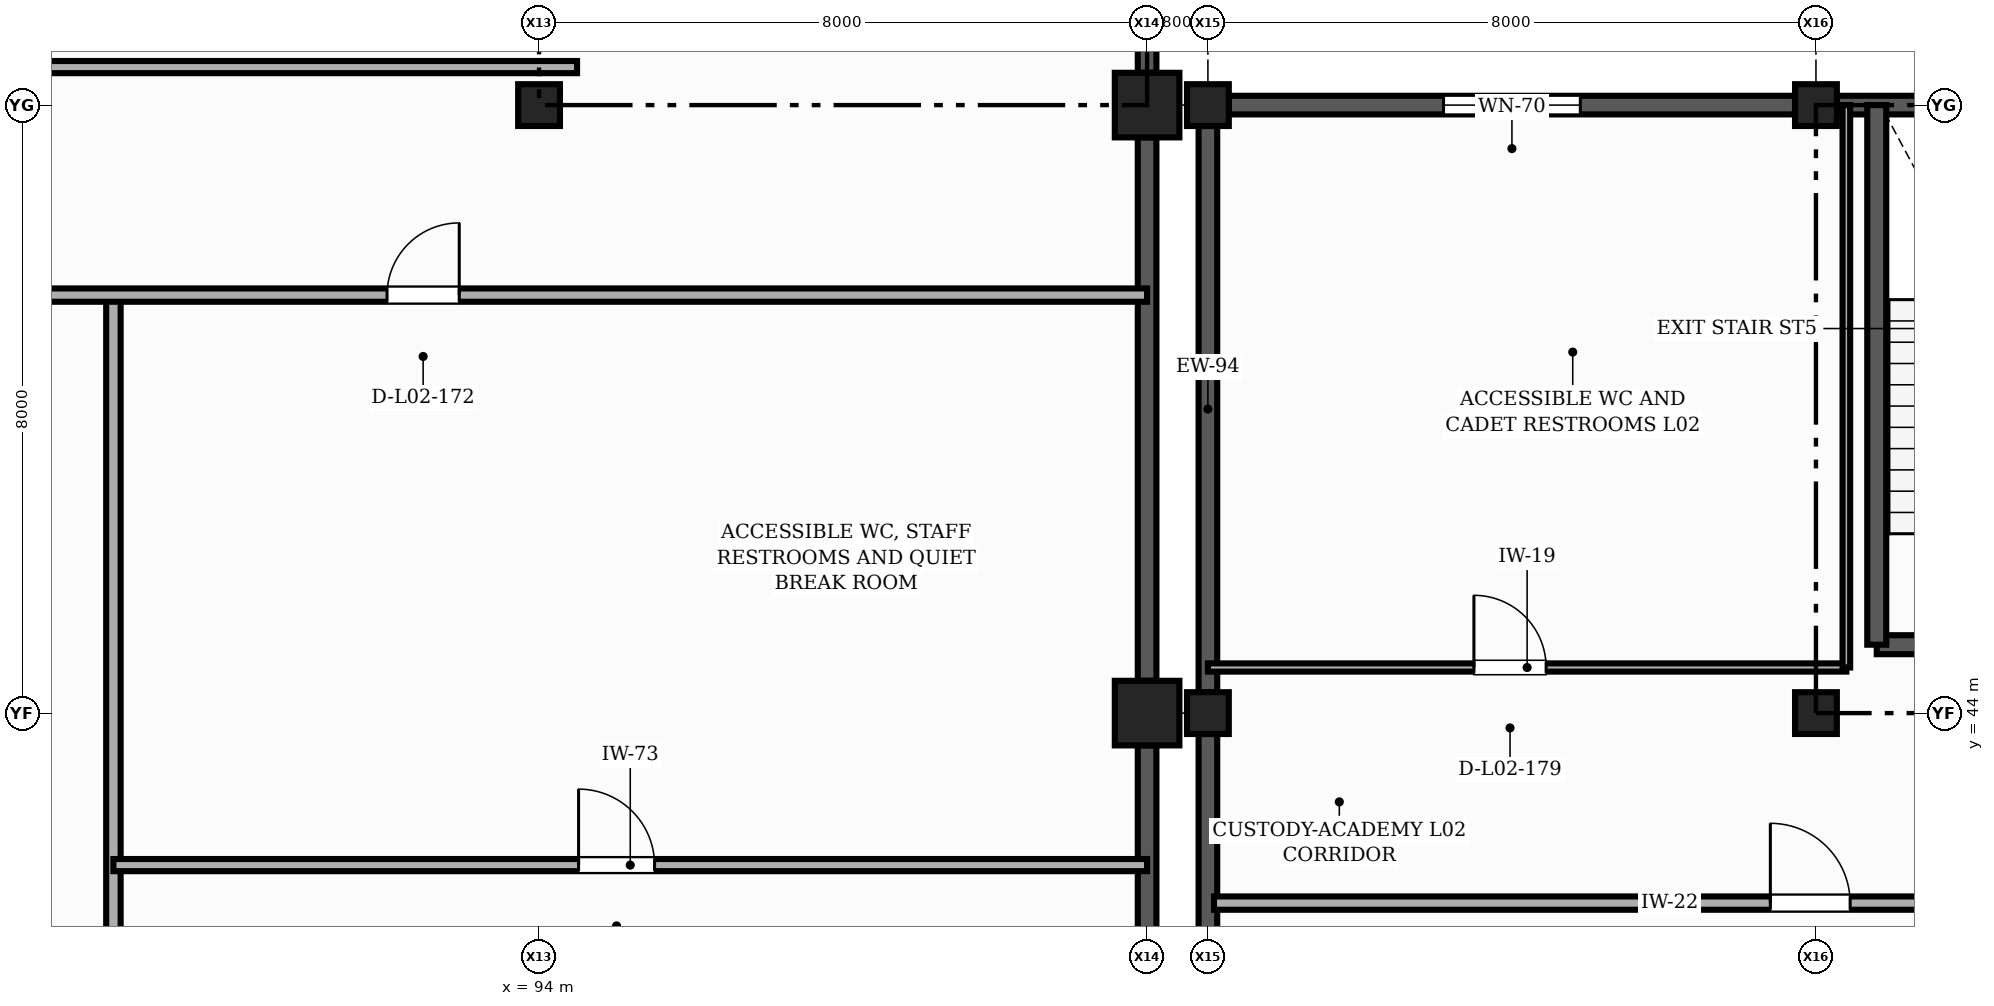
"""IFC4 building model, lengths in metres.
Left out: names, types, materials, properties, quantities, classifications, styles, units other than length and angle.
Written with IfcOpenShell. Run it as: python <this file> out.ifc"""

import sys

from ifc_helpers import new_model, si_unit, direction, frame, frame_2d, origin, origin_2d, place, context, subcontext, project, spatial, rectangle, extrude, element, fill, save


model = new_model("IFC4")
c1 = context("Model", 3, precision=1e-05, world=origin(), true_north=direction((0.0, 1.0)))
c2 = subcontext(c1, "Body", "Model", "MODEL_VIEW")
j1 = project(units=[si_unit("LENGTHUNIT", "METRE"), si_unit("PLANEANGLEUNIT", "RADIAN")], contexts=[c1])
p1 = place(None, origin())
s1 = spatial("IfcSite", under=j1, at=p1, CompositionType="ELEMENT")
p2 = place(p1, origin())
s2 = spatial("IfcBuilding", under=s1, at=p2, CompositionType="ELEMENT")
p3 = place(p2, frame((0.0, 0.0, 9.0)))
s3 = spatial("IfcBuildingStorey", under=s2, at=p3, CompositionType="ELEMENT", Elevation=9.0)
p4 = place(p3, frame((94.0, 52.0, 0.0), z_axis=(0.0, 0.0, 1.0), x_axis=(1.0, 0.0, 0.0)))
e1 = element("IfcColumn", 1, at=p4, inside=s3, PredefinedType="COLUMN", context=c2, shape_type="SweptSolid", body=[
    extrude(rectangle(XDim=0.55, YDim=0.55, at=origin_2d()), origin(), (0.0, 0.0, 1.0), 4.5),
])
for number, where, z_axis, x_axis in (
    (2, (102.0, 44.0, 0.0), (0.0, 0.0, 1.0), (1.0, 0.0, 0.0)),
    (3, (102.0, 52.0, 0.0), (0.0, 0.0, 1.0), (1.0, 0.0, 0.0)),
):
    element("IfcColumn", number, at=place(p3, frame(where, z_axis=z_axis, x_axis=x_axis)), inside=s3, PredefinedType="COLUMN", context=c2, shape_type="SweptSolid", body=[
        extrude(rectangle(XDim=0.85, YDim=0.85, at=origin_2d()), origin(), (0.0, 0.0, 1.0), 4.5),
    ])
for number, where, z_axis, x_axis in (
    (4, (102.8, 44.0, 0.0), (0.0, 0.0, 1.0), (1.0, 0.0, 0.0)),
    (5, (102.8, 52.0, 0.0), (0.0, 0.0, 1.0), (1.0, 0.0, 0.0)),
    (6, (110.8, 44.0, 0.0), (0.0, 0.0, 1.0), (1.0, 0.0, 0.0)),
    (7, (110.8, 52.0, 0.0), (0.0, 0.0, 1.0), (1.0, 0.0, 0.0)),
):
    element("IfcColumn", number, at=place(p3, frame(where, z_axis=z_axis, x_axis=x_axis)), inside=s3, PredefinedType="COLUMN", context=c2, shape_type="SweptSolid", body=[
        extrude(rectangle(XDim=0.55, YDim=0.55, at=origin_2d()), origin(), (0.0, 0.0, 1.0), 4.5),
    ])
for number, where, z_axis, x_axis in (
    (8, (102.0, 36.425, 0.0), (0.0, 0.0, 1.0), (0.0, 1.0, 0.0)),
    (9, (102.0, 44.425, 0.0), (0.0, 0.0, 1.0), (0.0, 1.0, 0.0)),
    (10, (102.0, 52.425, 0.0), (0.0, 0.0, 1.0), (0.0, 1.0, 0.0)),
):
    element("IfcWall", number, at=place(p3, frame(where, z_axis=z_axis, x_axis=x_axis)), inside=s3, PredefinedType="SOLIDWALL", context=c2, shape_type="SweptSolid", body=[
        extrude(rectangle(XDim=7.15, YDim=0.245, at=frame_2d((3.575, 0.0))), origin(), (0.0, 0.0, 1.0), 3.22),
    ])
p5 = place(p3, frame((118.525, 52.0, 0.0), z_axis=(0.0, 0.0, 1.0), x_axis=(-1.0, 0.0, 0.0)))
e11 = element("IfcWall", 11, at=p5, inside=s3, PredefinedType="SOLIDWALL", context=c2, shape_type="SweptSolid", body=[
    extrude(rectangle(XDim=7.45, YDim=0.245, at=frame_2d((3.725, 0.0))), origin(), (0.0, 0.0, 1.0), 4.22),
])
p6 = place(p3, frame((110.525, 52.0, 0.0), z_axis=(0.0, 0.0, 1.0), x_axis=(-1.0, 0.0, 0.0)))
e12 = element("IfcWall", 12, at=p6, inside=s3, PredefinedType="SOLIDWALL", context=c2, shape_type="SweptSolid", body=[
    extrude(rectangle(XDim=7.45, YDim=0.245, at=frame_2d((3.725, 0.0))), origin(), (0.0, 0.0, 1.0), 3.57),
])
p7 = place(p6, frame((2.825, 0.0, 0.9)))
e13 = element("IfcOpeningElement", 13, at=p7, cuts=e12, PredefinedType="OPENING", context=c2, shape_type="SweptSolid", body=[
    extrude(rectangle(XDim=1.8, YDim=1.4, at=frame_2d((0.9, 0.7))), frame((0.0, 0.133, 0.0), z_axis=(0.0, -1.0, 0.0), x_axis=(1.0, 0.0, 0.0)), (0.0, 0.0, 1.0), 0.265),
])
for number, where, z_axis, x_axis in (
    (14, (102.8, 51.725, 0.0), (0.0, 0.0, 1.0), (0.0, -1.0, 0.0)),
    (15, (102.8, 43.725, 0.0), (0.0, 0.0, 1.0), (0.0, -1.0, 0.0)),
):
    element("IfcWall", number, at=place(p3, frame(where, z_axis=z_axis, x_axis=x_axis)), inside=s3, PredefinedType="SOLIDWALL", context=c2, shape_type="SweptSolid", body=[
        extrude(rectangle(XDim=7.45, YDim=0.245, at=frame_2d((3.725, 0.0))), origin(), (0.0, 0.0, 1.0), 3.57),
    ])
p8 = place(p3, frame((111.6, 44.9, 0.0), z_axis=(0.0, 0.0, 1.0), x_axis=(1.0, 0.0, 0.0)))
e16 = element("IfcWall", 16, at=p8, inside=s3, PredefinedType="SHEAR", context=c2, shape_type="SweptSolid", body=[
    extrude(rectangle(XDim=3.12, YDim=0.25, at=frame_2d((1.56, 0.0))), origin(), (0.0, 0.0, 1.0), 4.5),
])
p9 = place(p8, frame((0.985, 0.0, 0.0)))
e17 = element("IfcOpeningElement", 17, at=p9, cuts=e16, PredefinedType="OPENING", context=c2, shape_type="SweptSolid", body=[
    extrude(rectangle(XDim=1.15, YDim=2.15, at=frame_2d((0.575, 1.075))), frame((0.0, 0.135, 0.0), z_axis=(0.0, -1.0, 0.0), x_axis=(1.0, 0.0, 0.0)), (0.0, 0.0, 1.0), 0.27),
])
p10 = place(p3, frame((111.6, 52.0, 0.0), z_axis=(0.0, 0.0, 1.0), x_axis=(0.0, -1.0, 0.0)))
e18 = element("IfcWall", 18, at=p10, inside=s3, PredefinedType="SHEAR", context=c2, shape_type="SweptSolid", body=[
    extrude(rectangle(XDim=7.1, YDim=0.25, at=frame_2d((3.55, 0.0))), origin(), (0.0, 0.0, 1.0), 4.5),
])
p11 = place(p3, frame((88.4, 23.2, 0.0), z_axis=(0.0, 0.0, 1.0), x_axis=(0.0, 1.0, 0.0)))
e19 = element("IfcWall", 19, at=p11, inside=s3, PredefinedType="PARTITIONING", context=c2, shape_type="SweptSolid", body=[
    extrude(rectangle(XDim=26.3, YDim=0.19, at=frame_2d((13.15, 0.0))), origin(), (0.0, 0.0, 1.0), 3.197),
])
p12 = place(p11, frame((8.0, 0.0, 0.0)))
e20 = element("IfcOpeningElement", 20, at=p12, cuts=e19, PredefinedType="OPENING", context=c2, shape_type="SweptSolid", body=[
    extrude(rectangle(XDim=1.2, YDim=2.15, at=frame_2d((0.6, 1.075))), frame((0.0, 0.105, 0.0), z_axis=(0.0, -1.0, 0.0), x_axis=(1.0, 0.0, 0.0)), (0.0, 0.0, 1.0), 0.21),
])
p13 = place(p3, frame((88.4, 42.0, 0.0), z_axis=(0.0, 0.0, 1.0), x_axis=(1.0, 0.0, 0.0)))
e21 = element("IfcWall", 21, at=p13, inside=s3, PredefinedType="PARTITIONING", context=c2, shape_type="SweptSolid", body=[
    extrude(rectangle(XDim=13.6, YDim=0.16, at=frame_2d((6.8, 0.0))), origin(), (0.0, 0.0, 1.0), 3.205),
])
p14 = place(p13, frame((6.12, 0.0, 0.0)))
e22 = element("IfcOpeningElement", 22, at=p14, cuts=e21, PredefinedType="OPENING", context=c2, shape_type="SweptSolid", body=[
    extrude(rectangle(XDim=1.0, YDim=2.15, at=frame_2d((0.5, 1.075))), frame((0.0, 0.09, 0.0), z_axis=(0.0, -1.0, 0.0), x_axis=(1.0, 0.0, 0.0)), (0.0, 0.0, 1.0), 0.18),
])
p15 = place(p3, frame((46.0, 49.5, 0.0), z_axis=(0.0, 0.0, 1.0), x_axis=(1.0, 0.0, 0.0)))
e23 = element("IfcWall", 23, at=p15, inside=s3, PredefinedType="PARTITIONING", context=c2, shape_type="SweptSolid", body=[
    extrude(rectangle(XDim=56.0, YDim=0.175, at=frame_2d((28.0, 0.0))), origin(), (0.0, 0.0, 1.0), 3.005),
])
p16 = place(p15, frame((6.0, 0.0, 0.0)))
e24 = element("IfcOpeningElement", 24, at=p16, cuts=e23, PredefinedType="OPENING", context=c2, shape_type="SweptSolid", body=[
    extrude(rectangle(XDim=1.2, YDim=2.15, at=frame_2d((0.6, 1.075))), frame((0.0, 0.098, 0.0), z_axis=(0.0, -1.0, 0.0), x_axis=(1.0, 0.0, 0.0)), (0.0, 0.0, 1.0), 0.195),
])
p17 = place(p15, frame((26.0, 0.0, 0.0)))
e25 = element("IfcOpeningElement", 25, at=p17, cuts=e23, PredefinedType="OPENING", context=c2, shape_type="SweptSolid", body=[
    extrude(rectangle(XDim=1.6, YDim=2.2, at=frame_2d((0.8, 1.1))), frame((0.0, 0.098, 0.0), z_axis=(0.0, -1.0, 0.0), x_axis=(1.0, 0.0, 0.0)), (0.0, 0.0, 1.0), 0.195),
])
p18 = place(p15, frame((46.0, 0.0, 0.0)))
e26 = element("IfcOpeningElement", 26, at=p18, cuts=e23, PredefinedType="OPENING", context=c2, shape_type="SweptSolid", body=[
    extrude(rectangle(XDim=0.95, YDim=2.15, at=frame_2d((0.475, 1.075))), frame((0.0, 0.098, 0.0), z_axis=(0.0, -1.0, 0.0), x_axis=(1.0, 0.0, 0.0)), (0.0, 0.0, 1.0), 0.195),
])
p19 = place(p3, frame((58.9, 52.5, 0.0), z_axis=(0.0, 0.0, 1.0), x_axis=(1.0, 0.0, 0.0)))
e27 = element("IfcWall", 27, at=p19, inside=s3, PredefinedType="PARTITIONING", context=c2, shape_type="SweptSolid", body=[
    extrude(rectangle(XDim=35.6, YDim=0.16, at=frame_2d((17.8, 0.0))), origin(), (0.0, 0.0, 1.0), 3.005),
])
p20 = place(p19, frame((5.5, 0.0, 0.0)))
e28 = element("IfcOpeningElement", 28, at=p20, cuts=e27, PredefinedType="OPENING", context=c2, shape_type="SweptSolid", body=[
    extrude(rectangle(XDim=1.1, YDim=2.1, at=frame_2d((0.55, 1.05))), frame((0.0, 0.09, 0.0), z_axis=(0.0, -1.0, 0.0), x_axis=(1.0, 0.0, 0.0)), (0.0, 0.0, 1.0), 0.18),
])
p21 = place(p19, frame((23.0, 0.0, 0.0)))
e29 = element("IfcOpeningElement", 29, at=p21, cuts=e27, PredefinedType="OPENING", context=c2, shape_type="SweptSolid", body=[
    extrude(rectangle(XDim=1.1, YDim=2.1, at=frame_2d((0.55, 1.05))), frame((0.0, 0.09, 0.0), z_axis=(0.0, -1.0, 0.0), x_axis=(1.0, 0.0, 0.0)), (0.0, 0.0, 1.0), 0.18),
])
p22 = place(p3, frame((102.88, 41.5, 0.0), z_axis=(0.0, 0.0, 1.0), x_axis=(1.0, 0.0, 0.0)))
e30 = element("IfcWall", 30, at=p22, inside=s3, PredefinedType="PARTITIONING", context=c2, shape_type="SweptSolid", body=[
    extrude(rectangle(XDim=55.84, YDim=0.175, at=frame_2d((27.92, 0.0))), origin(), (0.0, 0.0, 1.0), 3.555),
])
p23 = place(p22, frame((7.32, 0.0, 0.0)))
e31 = element("IfcOpeningElement", 31, at=p23, cuts=e30, PredefinedType="OPENING", context=c2, shape_type="SweptSolid", body=[
    extrude(rectangle(XDim=1.05, YDim=2.1, at=frame_2d((0.525, 1.05))), frame((0.0, 0.098, 0.0), z_axis=(0.0, -1.0, 0.0), x_axis=(1.0, 0.0, 0.0)), (0.0, 0.0, 1.0), 0.195),
])
p24 = place(p22, frame((22.87, 0.0, 0.0)))
e32 = element("IfcOpeningElement", 32, at=p24, cuts=e30, PredefinedType="OPENING", context=c2, shape_type="SweptSolid", body=[
    extrude(rectangle(XDim=1.05, YDim=2.1, at=frame_2d((0.525, 1.05))), frame((0.0, 0.098, 0.0), z_axis=(0.0, -1.0, 0.0), x_axis=(1.0, 0.0, 0.0)), (0.0, 0.0, 1.0), 0.195),
])
p25 = place(p22, frame((37.27, 0.0, 0.0)))
e33 = element("IfcOpeningElement", 33, at=p25, cuts=e30, PredefinedType="OPENING", context=c2, shape_type="SweptSolid", body=[
    extrude(rectangle(XDim=1.05, YDim=2.1, at=frame_2d((0.525, 1.05))), frame((0.0, 0.098, 0.0), z_axis=(0.0, -1.0, 0.0), x_axis=(1.0, 0.0, 0.0)), (0.0, 0.0, 1.0), 0.195),
])
p26 = place(p22, frame((49.5, 0.0, 0.0)))
e34 = element("IfcOpeningElement", 34, at=p26, cuts=e30, PredefinedType="OPENING", context=c2, shape_type="SweptSolid", body=[
    extrude(rectangle(XDim=1.05, YDim=2.1, at=frame_2d((0.525, 1.05))), frame((0.0, 0.098, 0.0), z_axis=(0.0, -1.0, 0.0), x_axis=(1.0, 0.0, 0.0)), (0.0, 0.0, 1.0), 0.195),
])
p27 = place(p3, frame((102.8, 44.6, 0.0), z_axis=(0.0, 0.0, 1.0), x_axis=(1.0, 0.0, 0.0)))
e35 = element("IfcWall", 35, at=p27, inside=s3, PredefinedType="PARTITIONING", context=c2, shape_type="SweptSolid", body=[
    extrude(rectangle(XDim=8.4, YDim=0.108, at=frame_2d((4.2, 0.0))), origin(), (0.0, 0.0, 1.0), 3.555),
])
p28 = place(p27, frame((3.5, 0.0, 0.0)))
e36 = element("IfcOpeningElement", 36, at=p28, cuts=e35, PredefinedType="OPENING", context=c2, shape_type="SweptSolid", body=[
    extrude(rectangle(XDim=0.95, YDim=2.15, at=frame_2d((0.475, 1.075))), frame((0.0, 0.064, 0.0), z_axis=(0.0, -1.0, 0.0), x_axis=(1.0, 0.0, 0.0)), (0.0, 0.0, 1.0), 0.128),
])
p29 = place(p3, frame((111.2, 44.6, 0.0), z_axis=(0.0, 0.0, 1.0), x_axis=(0.0, 1.0, 0.0)))
e37 = element("IfcWall", 37, at=p29, inside=s3, PredefinedType="PARTITIONING", context=c2, shape_type="SweptSolid", body=[
    extrude(rectangle(XDim=7.4, YDim=0.1, at=frame_2d((3.7, 0.0))), origin(), (0.0, 0.0, 1.0), 4.22),
])
p30 = place(p7, origin())
e38 = element("IfcWindow", 38, at=p30, inside=s3, PartitioningType="SINGLE_PANEL", PredefinedType="WINDOW", context=c2, shape_type="SweptSolid", body=[
    extrude(rectangle(XDim=1.8, YDim=1.4, at=frame_2d((0.9, 0.7))), frame((0.0, 0.03, 0.0), z_axis=(0.0, -1.0, 0.0), x_axis=(1.0, 0.0, 0.0)), (0.0, 0.0, 1.0), 0.06),
])
fill(e13, e38)
p31 = place(p14, origin())
e39 = element("IfcDoor", 39, at=p31, inside=s3, OperationType="SINGLE_SWING_LEFT", PredefinedType="DOOR", context=c2, shape_type="SweptSolid", body=[
    extrude(rectangle(XDim=1.0, YDim=2.15, at=frame_2d((0.5, 1.075))), frame((0.0, 0.025, 0.0), z_axis=(0.0, -1.0, 0.0), x_axis=(1.0, 0.0, 0.0)), (0.0, 0.0, 1.0), 0.05),
])
fill(e22, e39)
p32 = place(p18, origin())
e40 = element("IfcDoor", 40, at=p32, inside=s3, OperationType="SINGLE_SWING_RIGHT", PredefinedType="DOOR", context=c2, shape_type="SweptSolid", body=[
    extrude(rectangle(XDim=0.95, YDim=2.15, at=frame_2d((0.475, 1.075))), frame((0.0, 0.025, 0.0), z_axis=(0.0, -1.0, 0.0), x_axis=(1.0, 0.0, 0.0)), (0.0, 0.0, 1.0), 0.05),
])
fill(e26, e40)
p33 = place(p23, origin())
e41 = element("IfcDoor", 41, at=p33, inside=s3, OperationType="SINGLE_SWING_LEFT", PredefinedType="DOOR", context=c2, shape_type="SweptSolid", body=[
    extrude(rectangle(XDim=1.05, YDim=2.1, at=frame_2d((0.525, 1.05))), frame((0.0, 0.025, 0.0), z_axis=(0.0, -1.0, 0.0), x_axis=(1.0, 0.0, 0.0)), (0.0, 0.0, 1.0), 0.05),
])
fill(e31, e41)
p34 = place(p28, origin())
e42 = element("IfcDoor", 42, at=p34, inside=s3, OperationType="SINGLE_SWING_LEFT", PredefinedType="DOOR", context=c2, shape_type="SweptSolid", body=[
    extrude(rectangle(XDim=0.95, YDim=2.15, at=frame_2d((0.475, 1.075))), frame((0.0, 0.025, 0.0), z_axis=(0.0, -1.0, 0.0), x_axis=(1.0, 0.0, 0.0)), (0.0, 0.0, 1.0), 0.05),
])
fill(e36, e42)
save(model, sys.argv[1])
